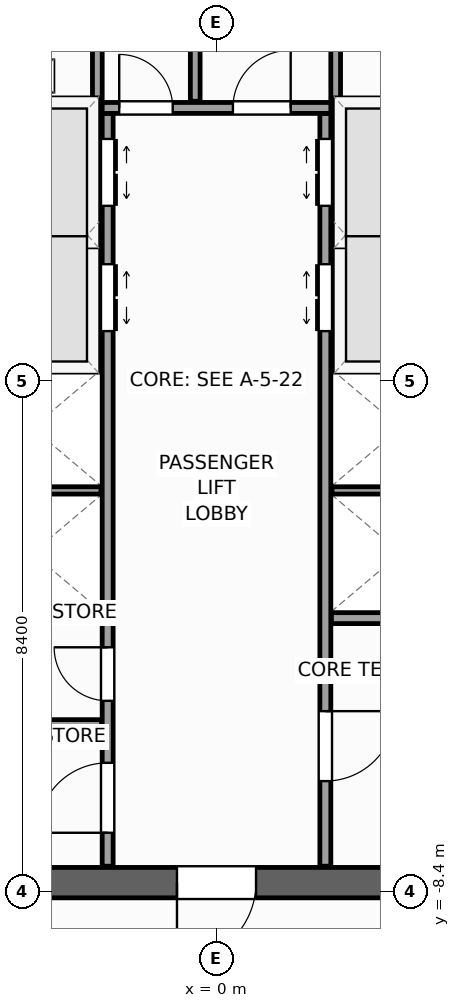
"""IFC4 building model, lengths in metres.
Left out: names, types, materials, properties, quantities, classifications, styles, units other than length and angle.
Written with IfcOpenShell. Run it as: python <this file> out.ifc"""

import sys

from ifc_helpers import new_model, si_unit, direction, frame, frame_2d, origin, place, context, subcontext, project, spatial, rectangle, extrude, source, transform, mapped, element, fill, save


model = new_model("IFC4")
c1 = context("Model", 3, precision=1e-05, world=origin(), true_north=direction((0.0, 1.0)))
c2 = subcontext(c1, "Body", "Model", "MODEL_VIEW")
j1 = project(units=[si_unit("LENGTHUNIT", "METRE"), si_unit("PLANEANGLEUNIT", "RADIAN")], contexts=[c1])
p1 = place(None, origin())
s1 = spatial("IfcSite", under=j1, at=p1, CompositionType="ELEMENT")
p2 = place(p1, origin())
s2 = spatial("IfcBuilding", under=s1, at=p2, CompositionType="ELEMENT")
p3 = place(p2, frame((0.0, 0.0, 232.9)))
s3 = spatial("IfcBuildingStorey", under=s2, at=p3, CompositionType="ELEMENT", Elevation=232.9)
p4 = place(p3, frame((-8.5, -8.25, 0.0), z_axis=(0.0, 0.0, 1.0), x_axis=(1.0, 0.0, 0.0)))
e1 = element("IfcWall", 1, at=p4, inside=s3, PredefinedType="SHEAR", context=c2, shape_type="SweptSolid", body=[
    extrude(rectangle(XDim=17.0, YDim=0.5, at=frame_2d((8.5, 0.0))), origin(), (0.0, 0.0, 1.0), 3.9),
])
p5 = place(p4, frame((7.85, 0.0, 0.0)))
e2 = element("IfcOpeningElement", 2, at=p5, cuts=e1, PredefinedType="OPENING", context=c2, shape_type="SweptSolid", body=[
    extrude(rectangle(XDim=1.3, YDim=2.2, at=frame_2d((0.65, 1.1))), frame((0.0, 0.26, 0.0), z_axis=(0.0, -1.0, 0.0), x_axis=(1.0, 0.0, 0.0)), (0.0, 0.0, 1.0), 0.52),
])
p6 = place(p3, frame((-29.154, -6.733, 0.0), z_axis=(0.0, 0.0, 1.0), x_axis=(0.77714192302, -0.629325378072, 0.0)))
e3 = element("IfcWall", 3, at=p6, inside=s3, PredefinedType="STANDARD", context=c2, shape_type="SweptSolid", body=[
    extrude(rectangle(XDim=36.84, YDim=0.34, at=frame_2d((18.42, 0.0))), origin(), (0.0, 0.0, 1.0), 2.96),
])
p7 = place(p6, frame((3.721, 0.0, 0.48)))
e4 = element("IfcOpeningElement", 4, at=p7, cuts=e3, PredefinedType="OPENING", context=c2, shape_type="SweptSolid", body=[
    extrude(rectangle(XDim=1.4, YDim=2.4, at=frame_2d((0.7, 1.2))), frame((0.0, 0.18, 0.0), z_axis=(0.0, -1.0, 0.0), x_axis=(1.0, 0.0, 0.0)), (0.0, 0.0, 1.0), 0.36),
])
p8 = place(p6, frame((9.809, 0.0, 0.58)))
e5 = element("IfcOpeningElement", 5, at=p8, cuts=e3, PredefinedType="OPENING", context=c2, shape_type="SweptSolid", body=[
    extrude(rectangle(XDim=1.75, YDim=2.3, at=frame_2d((0.875, 1.15))), frame((0.0, 0.18, 0.0), z_axis=(0.0, -1.0, 0.0), x_axis=(1.0, 0.0, 0.0)), (0.0, 0.0, 1.0), 0.36),
])
p9 = place(p6, frame((16.058, 0.0, 0.58)))
e6 = element("IfcOpeningElement", 6, at=p9, cuts=e3, PredefinedType="OPENING", context=c2, shape_type="SweptSolid", body=[
    extrude(rectangle(XDim=1.75, YDim=2.3, at=frame_2d((0.875, 1.15))), frame((0.0, 0.18, 0.0), z_axis=(0.0, -1.0, 0.0), x_axis=(1.0, 0.0, 0.0)), (0.0, 0.0, 1.0), 0.36),
])
p10 = place(p6, frame((24.176, 0.0, 0.58)))
e7 = element("IfcOpeningElement", 7, at=p10, cuts=e3, PredefinedType="OPENING", context=c2, shape_type="SweptSolid", body=[
    extrude(rectangle(XDim=1.75, YDim=2.3, at=frame_2d((0.875, 1.15))), frame((0.0, 0.18, 0.0), z_axis=(0.0, -1.0, 0.0), x_axis=(1.0, 0.0, 0.0)), (0.0, 0.0, 1.0), 0.36),
])
p11 = place(p6, frame((32.482, 0.0, 0.48)))
e8 = element("IfcOpeningElement", 8, at=p11, cuts=e3, PredefinedType="OPENING", context=c2, shape_type="SweptSolid", body=[
    extrude(rectangle(XDim=1.4, YDim=2.4, at=frame_2d((0.7, 1.2))), frame((0.0, 0.18, 0.0), z_axis=(0.0, -1.0, 0.0), x_axis=(1.0, 0.0, 0.0)), (0.0, 0.0, 1.0), 0.36),
])
p12 = place(p3, frame((-1.79, -7.98, 0.0), z_axis=(0.0, 0.0, 1.0), x_axis=(0.0, 1.0, 0.0)))
e9 = element("IfcWall", 9, at=p12, inside=s3, PredefinedType="PARTITIONING", context=c2, shape_type="SweptSolid", body=[
    extrude(rectangle(XDim=12.38, YDim=0.18, at=frame_2d((6.19, 0.0))), origin(), (0.0, 0.0, 1.0), 3.66),
])
p13 = place(p12, frame((8.8, 0.0, 0.0)))
e10 = element("IfcOpeningElement", 10, at=p13, cuts=e9, PredefinedType="OPENING", context=c2, shape_type="SweptSolid", body=[
    extrude(rectangle(XDim=1.1, YDim=2.2, at=frame_2d((0.55, 1.1))), frame((0.0, 0.1, 0.0), z_axis=(0.0, -1.0, 0.0), x_axis=(1.0, 0.0, 0.0)), (0.0, 0.0, 1.0), 0.2),
])
p14 = place(p12, frame((10.86, 0.0, 0.0)))
e11 = element("IfcOpeningElement", 11, at=p14, cuts=e9, PredefinedType="OPENING", context=c2, shape_type="SweptSolid", body=[
    extrude(rectangle(XDim=1.1, YDim=2.2, at=frame_2d((0.55, 1.1))), frame((0.0, 0.1, 0.0), z_axis=(0.0, -1.0, 0.0), x_axis=(1.0, 0.0, 0.0)), (0.0, 0.0, 1.0), 0.2),
])
p15 = place(p12, frame((0.55, 0.0, 0.0)))
e12 = element("IfcOpeningElement", 12, at=p15, cuts=e9, PredefinedType="OPENING", context=c2, shape_type="SweptSolid", body=[
    extrude(rectangle(XDim=1.15, YDim=2.25, at=frame_2d((0.575, 1.125))), frame((0.0, 0.1, 0.0), z_axis=(0.0, -1.0, 0.0), x_axis=(1.0, 0.0, 0.0)), (0.0, 0.0, 1.0), 0.2),
])
p16 = place(p12, frame((2.72, 0.0, 0.0)))
e13 = element("IfcOpeningElement", 13, at=p16, cuts=e9, PredefinedType="OPENING", context=c2, shape_type="SweptSolid", body=[
    extrude(rectangle(XDim=0.88, YDim=2.1, at=frame_2d((0.44, 1.05))), frame((0.0, 0.1, 0.0), z_axis=(0.0, -1.0, 0.0), x_axis=(1.0, 0.0, 0.0)), (0.0, 0.0, 1.0), 0.2),
])
p17 = place(p3, frame((1.79, -7.98, 0.0), z_axis=(0.0, 0.0, 1.0), x_axis=(0.0, 1.0, 0.0)))
e14 = element("IfcWall", 14, at=p17, inside=s3, PredefinedType="PARTITIONING", context=c2, shape_type="SweptSolid", body=[
    extrude(rectangle(XDim=12.38, YDim=0.18, at=frame_2d((6.19, 0.0))), origin(), (0.0, 0.0, 1.0), 3.66),
])
p18 = place(p17, frame((8.8, 0.0, 0.0)))
e15 = element("IfcOpeningElement", 15, at=p18, cuts=e14, PredefinedType="OPENING", context=c2, shape_type="SweptSolid", body=[
    extrude(rectangle(XDim=1.1, YDim=2.2, at=frame_2d((0.55, 1.1))), frame((0.0, 0.1, 0.0), z_axis=(0.0, -1.0, 0.0), x_axis=(1.0, 0.0, 0.0)), (0.0, 0.0, 1.0), 0.2),
])
p19 = place(p17, frame((10.86, 0.0, 0.0)))
e16 = element("IfcOpeningElement", 16, at=p19, cuts=e14, PredefinedType="OPENING", context=c2, shape_type="SweptSolid", body=[
    extrude(rectangle(XDim=1.1, YDim=2.2, at=frame_2d((0.55, 1.1))), frame((0.0, 0.1, 0.0), z_axis=(0.0, -1.0, 0.0), x_axis=(1.0, 0.0, 0.0)), (0.0, 0.0, 1.0), 0.2),
])
p20 = place(p17, frame((1.4, 0.0, 0.0)))
e17 = element("IfcOpeningElement", 17, at=p20, cuts=e14, PredefinedType="OPENING", context=c2, shape_type="SweptSolid", body=[
    extrude(rectangle(XDim=1.15, YDim=2.25, at=frame_2d((0.575, 1.125))), frame((0.0, 0.1, 0.0), z_axis=(0.0, -1.0, 0.0), x_axis=(1.0, 0.0, 0.0)), (0.0, 0.0, 1.0), 0.2),
])
p21 = place(p3, frame((-1.88, 4.49, 0.0), z_axis=(0.0, 0.0, 1.0), x_axis=(1.0, 0.0, 0.0)))
e18 = element("IfcWall", 18, at=p21, inside=s3, PredefinedType="PARTITIONING", context=c2, shape_type="SweptSolid", body=[
    extrude(rectangle(XDim=3.76, YDim=0.18, at=frame_2d((1.88, 0.0))), origin(), (0.0, 0.0, 1.0), 3.66),
])
p22 = place(p21, frame((0.28, 0.0, 0.0)))
e19 = element("IfcOpeningElement", 19, at=p22, cuts=e18, PredefinedType="OPENING", context=c2, shape_type="SweptSolid", body=[
    extrude(rectangle(XDim=0.88, YDim=2.1, at=frame_2d((0.44, 1.05))), frame((0.0, 0.1, 0.0), z_axis=(0.0, -1.0, 0.0), x_axis=(1.0, 0.0, 0.0)), (0.0, 0.0, 1.0), 0.2),
])
p23 = place(p21, frame((2.15, 0.0, 0.0)))
e20 = element("IfcOpeningElement", 20, at=p23, cuts=e18, PredefinedType="OPENING", context=c2, shape_type="SweptSolid", body=[
    extrude(rectangle(XDim=0.95, YDim=2.1, at=frame_2d((0.475, 1.05))), frame((0.0, 0.1, 0.0), z_axis=(0.0, -1.0, 0.0), x_axis=(1.0, 0.0, 0.0)), (0.0, 0.0, 1.0), 0.2),
])
for number, where, z_axis, x_axis in (
    (21, (-4.17, -3.9, 0.0), (0.0, 0.0, 1.0), (1.0, 0.0, 0.0)),
    (22, (1.89, -3.9, 0.0), (0.0, 0.0, 1.0), (1.0, 0.0, 0.0)),
    (23, (-4.17, 0.3, 0.0), (0.0, 0.0, 1.0), (1.0, 0.0, 0.0)),
    (24, (1.89, 0.3, 0.0), (0.0, 0.0, 1.0), (1.0, 0.0, 0.0)),
    (25, (-4.17, 4.49, 0.0), (0.0, 0.0, 1.0), (1.0, 0.0, 0.0)),
    (26, (1.89, 4.49, 0.0), (0.0, 0.0, 1.0), (1.0, 0.0, 0.0)),
):
    element("IfcWall", number, at=place(p3, frame(where, z_axis=z_axis, x_axis=x_axis)), inside=s3, PredefinedType="PARTITIONING", context=c2, shape_type="SweptSolid", body=[
        extrude(rectangle(XDim=2.28, YDim=0.18, at=frame_2d((1.14, 0.0))), origin(), (0.0, 0.0, 1.0), 3.66),
    ])
for number, where, z_axis, x_axis in (
    (27, (-4.16, -1.8, 0.0), (0.0, 0.0, 1.0), (1.0, 0.0, 0.0)),
    (28, (1.9, -1.8, 0.0), (0.0, 0.0, 1.0), (1.0, 0.0, 0.0)),
    (29, (-4.16, 2.4, 0.0), (0.0, 0.0, 1.0), (1.0, 0.0, 0.0)),
    (30, (1.9, 2.4, 0.0), (0.0, 0.0, 1.0), (1.0, 0.0, 0.0)),
):
    element("IfcWall", number, at=place(p3, frame(where, z_axis=z_axis, x_axis=x_axis)), inside=s3, PredefinedType="PARTITIONING", context=c2, shape_type="SweptSolid", body=[
        extrude(rectangle(XDim=2.26, YDim=0.12, at=frame_2d((1.13, 0.0))), origin(), (0.0, 0.0, 1.0), 3.66),
    ])
p24 = place(p3, frame((-4.17, -5.65, 0.0), z_axis=(0.0, 0.0, 1.0), x_axis=(1.0, 0.0, 0.0)))
e31 = element("IfcWall", 31, at=p24, inside=s3, PredefinedType="PARTITIONING", context=c2, shape_type="SweptSolid", body=[
    extrude(rectangle(XDim=2.28, YDim=0.16, at=frame_2d((1.14, 0.0))), origin(), (0.0, 0.0, 1.0), 3.66),
])
for number, where, z_axis, x_axis in (
    (32, (-1.96, 4.58, 0.0), (0.0, 0.0, 1.0), (0.0, 1.0, 0.0)),
    (33, (1.96, 4.58, 0.0), (0.0, 0.0, 1.0), (0.0, 1.0, 0.0)),
):
    element("IfcWall", number, at=place(p3, frame(where, z_axis=z_axis, x_axis=x_axis)), inside=s3, PredefinedType="PARTITIONING", context=c2, shape_type="SweptSolid", body=[
        extrude(rectangle(XDim=3.4, YDim=0.16, at=frame_2d((1.7, 0.0))), origin(), (0.0, 0.0, 1.0), 3.66),
    ])
p25 = place(p3, frame((-0.35, 4.6, 0.0), z_axis=(0.0, 0.0, 1.0), x_axis=(0.0, 1.0, 0.0)))
e34 = element("IfcWall", 34, at=p25, inside=s3, PredefinedType="PARTITIONING", context=c2, shape_type="SweptSolid", body=[
    extrude(rectangle(XDim=3.38, YDim=0.16, at=frame_2d((1.69, 0.0))), origin(), (0.0, 0.0, 1.0), 3.66),
])
m1 = source(origin(), c2, "Body", "SweptSolid", [
    extrude(rectangle(XDim=1.3, YDim=2.2, at=frame_2d((0.65, 1.1))), frame((0.0, 0.025, 0.0), z_axis=(0.0, -1.0, 0.0), x_axis=(1.0, 0.0, 0.0)), (0.0, 0.0, 1.0), 0.05),
])
p26 = place(p5, frame((1.3, 0.0, 0.0), z_axis=(0.0, 0.0, 1.0), x_axis=(-1.0, 0.0, 0.0)))
e35 = element("IfcDoor", 35, at=p26, inside=s3, OperationType="SINGLE_SWING_LEFT", PredefinedType="DOOR", context=c2, shape_type="MappedRepresentation", body=[
    mapped(m1, transform((0.0, 0.0, 0.0), scale=1.0)),
])
fill(e2, e35)
m2 = source(origin(), c2, "Body", "SweptSolid", [
    extrude(rectangle(XDim=1.1, YDim=2.2, at=frame_2d((0.55, 1.1))), frame((0.0, 0.025, 0.0), z_axis=(0.0, -1.0, 0.0), x_axis=(1.0, 0.0, 0.0)), (0.0, 0.0, 1.0), 0.05),
])
p27 = place(p13, frame((1.1, 0.0, 0.0), z_axis=(0.0, 0.0, 1.0), x_axis=(-1.0, 0.0, 0.0)))
e36 = element("IfcDoor", 36, at=p27, inside=s3, OperationType="DOUBLE_DOOR_SLIDING", PredefinedType="DOOR", context=c2, shape_type="MappedRepresentation", body=[
    mapped(m2, transform((0.0, 0.0, 0.0), scale=1.0)),
])
fill(e10, e36)
p28 = place(p14, frame((1.1, 0.0, 0.0), z_axis=(0.0, 0.0, 1.0), x_axis=(-1.0, 0.0, 0.0)))
e37 = element("IfcDoor", 37, at=p28, inside=s3, OperationType="DOUBLE_DOOR_SLIDING", PredefinedType="DOOR", context=c2, shape_type="MappedRepresentation", body=[
    mapped(m2, transform((0.0, 0.0, 0.0), scale=1.0)),
])
fill(e11, e37)
p29 = place(p18, origin())
e38 = element("IfcDoor", 38, at=p29, inside=s3, OperationType="DOUBLE_DOOR_SLIDING", PredefinedType="DOOR", context=c2, shape_type="MappedRepresentation", body=[
    mapped(m2, transform((0.0, 0.0, 0.0), scale=1.0)),
])
fill(e15, e38)
p30 = place(p19, origin())
e39 = element("IfcDoor", 39, at=p30, inside=s3, OperationType="DOUBLE_DOOR_SLIDING", PredefinedType="DOOR", context=c2, shape_type="MappedRepresentation", body=[
    mapped(m2, transform((0.0, 0.0, 0.0), scale=1.0)),
])
fill(e16, e39)
m3 = source(origin(), c2, "Body", "SweptSolid", [
    extrude(rectangle(XDim=1.15, YDim=2.25, at=frame_2d((0.575, 1.125))), frame((0.0, 0.025, 0.0), z_axis=(0.0, -1.0, 0.0), x_axis=(1.0, 0.0, 0.0)), (0.0, 0.0, 1.0), 0.05),
])
p31 = place(p15, origin())
e40 = element("IfcDoor", 40, at=p31, inside=s3, OperationType="SINGLE_SWING_LEFT", PredefinedType="DOOR", context=c2, shape_type="MappedRepresentation", body=[
    mapped(m3, transform((0.0, 0.0, 0.0), scale=1.0)),
])
fill(e12, e40)
m4 = source(origin(), c2, "Body", "SweptSolid", [
    extrude(rectangle(XDim=0.88, YDim=2.1, at=frame_2d((0.44, 1.05))), frame((0.0, 0.025, 0.0), z_axis=(0.0, -1.0, 0.0), x_axis=(1.0, 0.0, 0.0)), (0.0, 0.0, 1.0), 0.05),
])
p32 = place(p16, origin())
e41 = element("IfcDoor", 41, at=p32, inside=s3, OperationType="SINGLE_SWING_RIGHT", PredefinedType="DOOR", context=c2, shape_type="MappedRepresentation", body=[
    mapped(m4, transform((0.0, 0.0, 0.0), scale=1.0)),
])
fill(e13, e41)
p33 = place(p20, frame((1.15, 0.0, 0.0), z_axis=(0.0, 0.0, 1.0), x_axis=(-1.0, 0.0, 0.0)))
e42 = element("IfcDoor", 42, at=p33, inside=s3, OperationType="SINGLE_SWING_RIGHT", PredefinedType="DOOR", context=c2, shape_type="MappedRepresentation", body=[
    mapped(m3, transform((0.0, 0.0, 0.0), scale=1.0)),
])
fill(e17, e42)
p34 = place(p22, origin())
e43 = element("IfcDoor", 43, at=p34, inside=s3, OperationType="SINGLE_SWING_LEFT", PredefinedType="DOOR", context=c2, shape_type="MappedRepresentation", body=[
    mapped(m4, transform((0.0, 0.0, 0.0), scale=1.0)),
])
fill(e19, e43)
m5 = source(origin(), c2, "Body", "SweptSolid", [
    extrude(rectangle(XDim=0.95, YDim=2.1, at=frame_2d((0.475, 1.05))), frame((0.0, 0.025, 0.0), z_axis=(0.0, -1.0, 0.0), x_axis=(1.0, 0.0, 0.0)), (0.0, 0.0, 1.0), 0.05),
])
p35 = place(p23, origin())
e44 = element("IfcDoor", 44, at=p35, inside=s3, OperationType="SINGLE_SWING_RIGHT", PredefinedType="DOOR", context=c2, shape_type="MappedRepresentation", body=[
    mapped(m5, transform((0.0, 0.0, 0.0), scale=1.0)),
])
fill(e20, e44)
save(model, sys.argv[1])
